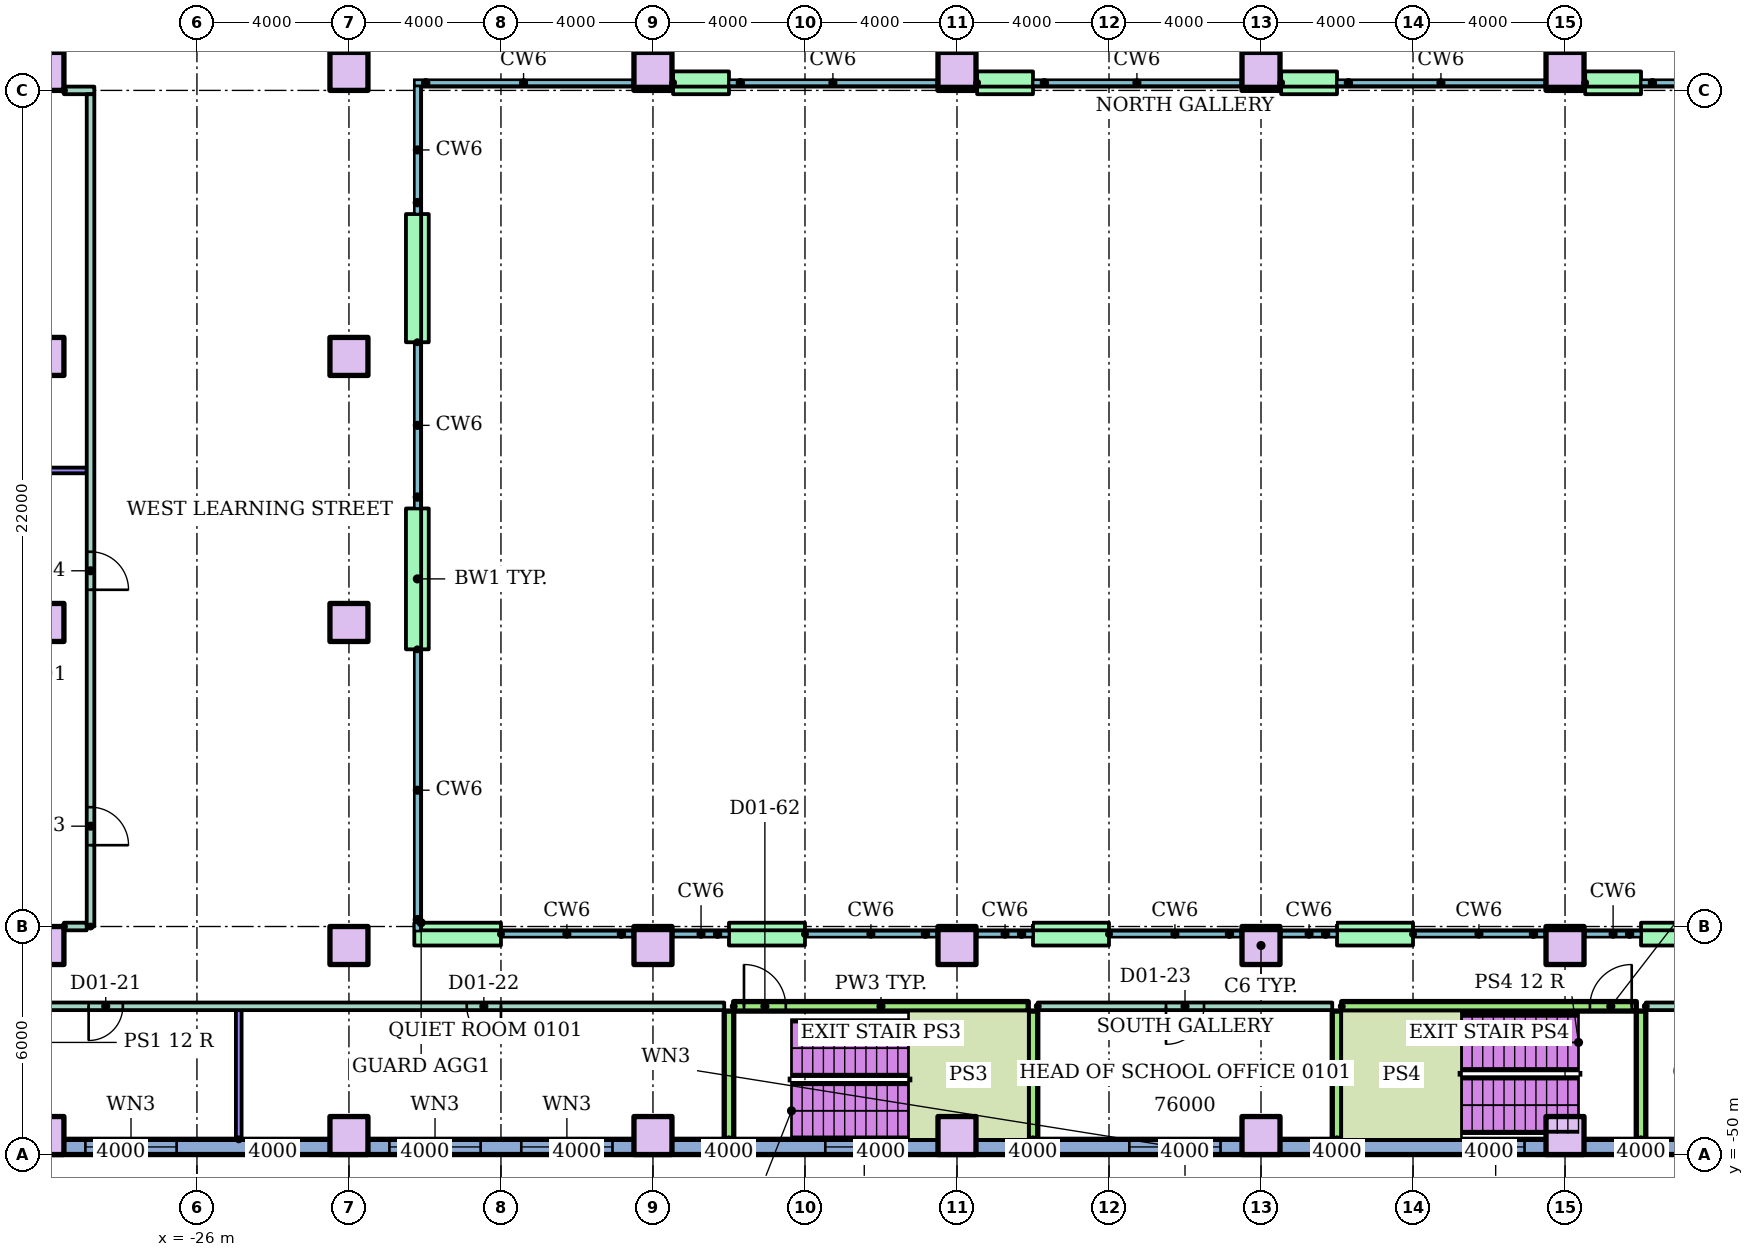
"""IFC4 building model, lengths in metres.
Left out: names, types, materials, properties, quantities, classifications, styles, units other than length and angle.
Written with IfcOpenShell. Run it as: python <this file> out.ifc"""

import sys

from ifc_helpers import new_model, si_unit, direction, frame, frame_2d, origin, origin_2d, place, context, subcontext, project, spatial, rectangle, extrude, element, fill, save


model = new_model("IFC4")
c1 = context("Model", 3, precision=1e-05, world=origin(), true_north=direction((0.0, 1.0)))
c2 = subcontext(c1, "Body", "Model", "MODEL_VIEW")
j1 = project(units=[si_unit("LENGTHUNIT", "METRE"), si_unit("PLANEANGLEUNIT", "RADIAN")], contexts=[c1])
p1 = place(None, origin())
s1 = spatial("IfcSite", under=j1, at=p1, CompositionType="ELEMENT")
p2 = place(p1, origin())
s2 = spatial("IfcBuilding", under=s1, at=p2, CompositionType="ELEMENT")
p3 = place(p2, frame((0.0, 0.0, 6.0)))
s3 = spatial("IfcBuildingStorey", under=s2, at=p3, CompositionType="ELEMENT", Elevation=6.0)
for number, where in (
    (1, (-30.0, -49.5, 0.0)),
    (2, (-22.0, -49.5, 0.0)),
    (3, (-14.0, -49.5, 0.0)),
    (4, (-6.0, -49.5, 0.0)),
    (5, (2.0, -49.5, 0.0)),
    (6, (10.0, -49.5, 0.0)),
    (7, (-30.0, -44.5, 0.0)),
    (8, (-22.0, -44.5, 0.0)),
    (9, (-14.0, -44.5, 0.0)),
    (10, (-6.0, -44.5, 0.0)),
    (11, (2.0, -44.5, 0.0)),
    (12, (10.0, -44.5, 0.0)),
    (13, (-30.0, -36.0, 0.0)),
    (14, (-22.0, -36.0, 0.0)),
    (15, (-30.0, -29.0, 0.0)),
    (16, (-22.0, -29.0, 0.0)),
    (17, (-30.0, -21.5, 0.0)),
    (18, (-22.0, -21.5, 0.0)),
    (19, (-14.0, -21.5, 0.0)),
    (20, (-6.0, -21.5, 0.0)),
    (21, (2.0, -21.5, 0.0)),
    (22, (10.0, -21.5, 0.0)),
):
    element("IfcColumn", number, at=place(p3, frame(where)), inside=s3, PredefinedType="COLUMN", context=c2, shape_type="SweptSolid", body=[
        extrude(rectangle(XDim=1.0, YDim=1.0, at=origin_2d()), origin(), (0.0, 0.0, 1.0), 4.0),
    ])
p4 = place(p3, frame((-39.6, -49.8, 0.0)))
e23 = element("IfcWall", 23, at=p4, inside=s3, PredefinedType="STANDARD", context=c2, shape_type="SweptSolid", body=[
    extrude(rectangle(XDim=79.2, YDim=0.4, at=frame_2d((39.6, 0.0))), origin(), (0.0, 0.0, 1.0), 3.7),
])
p5 = place(p4, frame((10.665, 0.0, 0.9)))
e24 = element("IfcOpeningElement", 24, at=p5, cuts=e23, PredefinedType="OPENING", context=c2, shape_type="SweptSolid", body=[
    extrude(rectangle(XDim=2.4, YDim=2.1, at=frame_2d((1.2, 1.05))), frame((0.0, 0.21, 0.0), z_axis=(0.0, -1.0, 0.0), x_axis=(1.0, 0.0, 0.0)), (0.0, 0.0, 1.0), 0.42),
])
p6 = place(p4, frame((18.665, 0.0, 0.9)))
e25 = element("IfcOpeningElement", 25, at=p6, cuts=e23, PredefinedType="OPENING", context=c2, shape_type="SweptSolid", body=[
    extrude(rectangle(XDim=2.4, YDim=2.1, at=frame_2d((1.2, 1.05))), frame((0.0, 0.21, 0.0), z_axis=(0.0, -1.0, 0.0), x_axis=(1.0, 0.0, 0.0)), (0.0, 0.0, 1.0), 0.42),
])
p7 = place(p4, frame((22.135, 0.0, 0.9)))
e26 = element("IfcOpeningElement", 26, at=p7, cuts=e23, PredefinedType="OPENING", context=c2, shape_type="SweptSolid", body=[
    extrude(rectangle(XDim=2.4, YDim=2.1, at=frame_2d((1.2, 1.05))), frame((0.0, 0.21, 0.0), z_axis=(0.0, -1.0, 0.0), x_axis=(1.0, 0.0, 0.0)), (0.0, 0.0, 1.0), 0.42),
])
p8 = place(p4, frame((30.135, 0.0, 0.9)))
e27 = element("IfcOpeningElement", 27, at=p8, cuts=e23, PredefinedType="OPENING", context=c2, shape_type="SweptSolid", body=[
    extrude(rectangle(XDim=2.05, YDim=2.1, at=frame_2d((1.025, 1.05))), frame((0.0, 0.21, 0.0), z_axis=(0.0, -1.0, 0.0), x_axis=(1.0, 0.0, 0.0)), (0.0, 0.0, 1.0), 0.42),
])
p9 = place(p4, frame((38.135, 0.0, 0.9)))
e28 = element("IfcOpeningElement", 28, at=p9, cuts=e23, PredefinedType="OPENING", context=c2, shape_type="SweptSolid", body=[
    extrude(rectangle(XDim=2.4, YDim=2.1, at=frame_2d((1.2, 1.05))), frame((0.0, 0.21, 0.0), z_axis=(0.0, -1.0, 0.0), x_axis=(1.0, 0.0, 0.0)), (0.0, 0.0, 1.0), 0.42),
])
p10 = place(p4, frame((47.015, 0.0, 0.9)))
e29 = element("IfcOpeningElement", 29, at=p10, cuts=e23, PredefinedType="OPENING", context=c2, shape_type="SweptSolid", body=[
    extrude(rectangle(XDim=1.52, YDim=2.1, at=frame_2d((0.76, 1.05))), frame((0.0, 0.21, 0.0), z_axis=(0.0, -1.0, 0.0), x_axis=(1.0, 0.0, 0.0)), (0.0, 0.0, 1.0), 0.42),
])
p11 = place(p4, frame((54.135, 0.0, 0.9)))
e30 = element("IfcOpeningElement", 30, at=p11, cuts=e23, PredefinedType="OPENING", context=c2, shape_type="SweptSolid", body=[
    extrude(rectangle(XDim=2.4, YDim=2.1, at=frame_2d((1.2, 1.05))), frame((0.0, 0.21, 0.0), z_axis=(0.0, -1.0, 0.0), x_axis=(1.0, 0.0, 0.0)), (0.0, 0.0, 1.0), 0.42),
])
p12 = place(p4, frame((66.665, 0.0, 0.9)))
e31 = element("IfcOpeningElement", 31, at=p12, cuts=e23, PredefinedType="OPENING", context=c2, shape_type="SweptSolid", body=[
    extrude(rectangle(XDim=2.4, YDim=2.1, at=frame_2d((1.2, 1.05))), frame((0.0, 0.21, 0.0), z_axis=(0.0, -1.0, 0.0), x_axis=(1.0, 0.0, 0.0)), (0.0, 0.0, 1.0), 0.42),
])
for number, where, z_axis, x_axis in (
    (32, (14.0, -44.2, 0.0), (0.0, 0.0, 1.0), (-1.0, 0.0, 0.0)),
    (33, (6.0, -44.2, 0.0), (0.0, 0.0, 1.0), (-1.0, 0.0, 0.0)),
    (34, (-2.0, -44.2, 0.0), (0.0, 0.0, 1.0), (-1.0, 0.0, 0.0)),
    (35, (-10.0, -44.2, 0.0), (0.0, 0.0, 1.0), (-1.0, 0.0, 0.0)),
):
    element("IfcWall", number, at=place(p3, frame(where, z_axis=z_axis, x_axis=x_axis)), inside=s3, PredefinedType="STANDARD", context=c2, shape_type="SweptSolid", body=[
        extrude(rectangle(XDim=2.0, YDim=0.6, at=frame_2d((1.0, 0.0))), origin(), (0.0, 0.0, 1.0), 3.7),
    ])
p13 = place(p3, frame((-18.0, -44.2, 0.0), z_axis=(0.0, 0.0, 1.0), x_axis=(-1.0, 0.0, 0.0)))
e36 = element("IfcWall", 36, at=p13, inside=s3, PredefinedType="STANDARD", context=c2, shape_type="SweptSolid", body=[
    extrude(rectangle(XDim=2.28, YDim=0.6, at=frame_2d((1.14, 0.0))), origin(), (0.0, 0.0, 1.0), 3.7),
])
p14 = place(p3, frame((-20.2, -36.707, 0.0), z_axis=(0.0, 0.0, 1.0), x_axis=(0.0, 1.0, 0.0)))
e37 = element("IfcWall", 37, at=p14, inside=s3, PredefinedType="STANDARD", context=c2, shape_type="SweptSolid", body=[
    extrude(rectangle(XDim=3.707, YDim=0.6, at=frame_2d((1.854, 0.0))), origin(), (0.0, 0.0, 1.0), 3.7),
])
p15 = place(p3, frame((-20.2, -28.627, 0.0), z_axis=(0.0, 0.0, 1.0), x_axis=(0.0, 1.0, 0.0)))
e38 = element("IfcWall", 38, at=p15, inside=s3, PredefinedType="STANDARD", context=c2, shape_type="SweptSolid", body=[
    extrude(rectangle(XDim=3.373, YDim=0.6, at=frame_2d((1.687, 0.0))), origin(), (0.0, 0.0, 1.0), 3.7),
])
for number, where in (
    (39, (-13.47, -21.8, 0.0)),
    (40, (-5.47, -21.8, 0.0)),
    (41, (2.53, -21.8, 0.0)),
    (42, (10.53, -21.8, 0.0)),
):
    element("IfcWall", number, at=place(p3, frame(where)), inside=s3, PredefinedType="STANDARD", context=c2, shape_type="SweptSolid", body=[
        extrude(rectangle(XDim=1.47, YDim=0.6, at=frame_2d((0.735, 0.0))), origin(), (0.0, 0.0, 1.0), 3.7),
    ])
p16 = place(p3, frame((-31.775, -46.1, 0.0)))
e43 = element("IfcWall", 43, at=p16, inside=s3, PredefinedType="PARTITIONING", context=c2, shape_type="SweptSolid", body=[
    extrude(rectangle(XDim=19.65, YDim=0.2, at=frame_2d((9.825, 0.0))), origin(), (0.0, 0.0, 1.0), 3.7),
])
p17 = place(p16, frame((2.925, 0.0, 0.0)))
e44 = element("IfcOpeningElement", 44, at=p17, cuts=e43, PredefinedType="OPENING", context=c2, shape_type="SweptSolid", body=[
    extrude(rectangle(XDim=0.9, YDim=2.1, at=frame_2d((0.45, 1.05))), frame((0.0, 0.11, 0.0), z_axis=(0.0, -1.0, 0.0), x_axis=(1.0, 0.0, 0.0)), (0.0, 0.0, 1.0), 0.22),
])
p18 = place(p16, frame((12.875, 0.0, 0.0)))
e45 = element("IfcOpeningElement", 45, at=p18, cuts=e43, PredefinedType="OPENING", context=c2, shape_type="SweptSolid", body=[
    extrude(rectangle(XDim=0.9, YDim=2.1, at=frame_2d((0.45, 1.05))), frame((0.0, 0.11, 0.0), z_axis=(0.0, -1.0, 0.0), x_axis=(1.0, 0.0, 0.0)), (0.0, 0.0, 1.0), 0.22),
])
p19 = place(p3, frame((-3.875, -46.1, 0.0)))
e46 = element("IfcWall", 46, at=p19, inside=s3, PredefinedType="PARTITIONING", context=c2, shape_type="SweptSolid", body=[
    extrude(rectangle(XDim=7.75, YDim=0.2, at=frame_2d((3.875, 0.0))), origin(), (0.0, 0.0, 1.0), 3.7),
])
p20 = place(p19, frame((3.375, 0.0, 0.0)))
e47 = element("IfcOpeningElement", 47, at=p20, cuts=e46, PredefinedType="OPENING", context=c2, shape_type="SweptSolid", body=[
    extrude(rectangle(XDim=1.0, YDim=2.1, at=frame_2d((0.5, 1.05))), frame((0.0, 0.11, 0.0), z_axis=(0.0, -1.0, 0.0), x_axis=(1.0, 0.0, 0.0)), (0.0, 0.0, 1.0), 0.22),
])
p21 = place(p3, frame((12.125, -46.1, 0.0)))
e48 = element("IfcWall", 48, at=p21, inside=s3, PredefinedType="PARTITIONING", context=c2, shape_type="SweptSolid", body=[
    extrude(rectangle(XDim=19.65, YDim=0.2, at=frame_2d((9.825, 0.0))), origin(), (0.0, 0.0, 1.0), 3.7),
])
p22 = place(p21, frame((3.425, 0.0, 0.0)))
e49 = element("IfcOpeningElement", 49, at=p22, cuts=e48, PredefinedType="OPENING", context=c2, shape_type="SweptSolid", body=[
    extrude(rectangle(XDim=0.9, YDim=2.1, at=frame_2d((0.45, 1.05))), frame((0.0, 0.11, 0.0), z_axis=(0.0, -1.0, 0.0), x_axis=(1.0, 0.0, 0.0)), (0.0, 0.0, 1.0), 0.22),
])
p23 = place(p21, frame((12.225, 0.0, 0.0)))
e50 = element("IfcOpeningElement", 50, at=p23, cuts=e48, PredefinedType="OPENING", context=c2, shape_type="SweptSolid", body=[
    extrude(rectangle(XDim=1.0, YDim=2.1, at=frame_2d((0.5, 1.05))), frame((0.0, 0.11, 0.0), z_axis=(0.0, -1.0, 0.0), x_axis=(1.0, 0.0, 0.0)), (0.0, 0.0, 1.0), 0.22),
])
p24 = place(p3, frame((-11.875, -46.1, 0.0)))
e51 = element("IfcWall", 51, at=p24, inside=s3, PredefinedType="SOLIDWALL", context=c2, shape_type="SweptSolid", body=[
    extrude(rectangle(XDim=7.75, YDim=0.25, at=frame_2d((3.875, 0.0))), origin(), (0.0, 0.0, 1.0), 3.7),
])
p25 = place(p24, frame((0.27, 0.0, 0.0)))
e52 = element("IfcOpeningElement", 52, at=p25, cuts=e51, PredefinedType="OPENING", context=c2, shape_type="SweptSolid", body=[
    extrude(rectangle(XDim=1.1, YDim=2.1, at=frame_2d((0.55, 1.05))), frame((0.0, 0.135, 0.0), z_axis=(0.0, -1.0, 0.0), x_axis=(1.0, 0.0, 0.0)), (0.0, 0.0, 1.0), 0.27),
])
p26 = place(p3, frame((4.125, -46.1, 0.0)))
e53 = element("IfcWall", 53, at=p26, inside=s3, PredefinedType="SOLIDWALL", context=c2, shape_type="SweptSolid", body=[
    extrude(rectangle(XDim=7.75, YDim=0.25, at=frame_2d((3.875, 0.0))), origin(), (0.0, 0.0, 1.0), 3.7),
])
p27 = place(p26, frame((6.53, 0.0, 0.0)))
e54 = element("IfcOpeningElement", 54, at=p27, cuts=e53, PredefinedType="OPENING", context=c2, shape_type="SweptSolid", body=[
    extrude(rectangle(XDim=1.1, YDim=2.1, at=frame_2d((0.55, 1.05))), frame((0.0, 0.135, 0.0), z_axis=(0.0, -1.0, 0.0), x_axis=(1.0, 0.0, 0.0)), (0.0, 0.0, 1.0), 0.27),
])
p28 = place(p3, frame((-29.5, -44.0, 0.0)))
e55 = element("IfcWall", 55, at=p28, inside=s3, PredefinedType="PARTITIONING", context=c2, shape_type="SweptSolid", body=[
    extrude(rectangle(XDim=0.6, YDim=0.2, at=frame_2d((0.3, 0.0))), origin(), (0.0, 0.0, 1.0), 3.7),
])
p29 = place(p3, frame((-39.6, -32.0, 0.0)))
e56 = element("IfcWall", 56, at=p29, inside=s3, PredefinedType="PARTITIONING", context=c2, shape_type="SweptSolid", body=[
    extrude(rectangle(XDim=10.7, YDim=0.15, at=frame_2d((5.35, 0.0))), origin(), (0.0, 0.0, 1.0), 3.7),
])
p30 = place(p3, frame((-29.5, -22.0, 0.0)))
e57 = element("IfcWall", 57, at=p30, inside=s3, PredefinedType="PARTITIONING", context=c2, shape_type="SweptSolid", body=[
    extrude(rectangle(XDim=0.8, YDim=0.2, at=frame_2d((0.4, 0.0))), origin(), (0.0, 0.0, 1.0), 3.7),
])
p31 = place(p3, frame((-28.8, -44.0, 0.0), z_axis=(0.0, 0.0, 1.0), x_axis=(0.0, 1.0, 0.0)))
e58 = element("IfcWall", 58, at=p31, inside=s3, PredefinedType="PARTITIONING", context=c2, shape_type="SweptSolid", body=[
    extrude(rectangle(XDim=21.9, YDim=0.2, at=frame_2d((10.95, 0.0))), origin(), (0.0, 0.0, 1.0), 3.7),
])
p32 = place(p31, frame((2.14, 0.0, 0.0)))
e59 = element("IfcOpeningElement", 59, at=p32, cuts=e58, PredefinedType="OPENING", context=c2, shape_type="SweptSolid", body=[
    extrude(rectangle(XDim=1.0, YDim=2.1, at=frame_2d((0.5, 1.05))), frame((0.0, 0.11, 0.0), z_axis=(0.0, -1.0, 0.0), x_axis=(1.0, 0.0, 0.0)), (0.0, 0.0, 1.0), 0.22),
])
p33 = place(p31, frame((8.86, 0.0, 0.0)))
e60 = element("IfcOpeningElement", 60, at=p33, cuts=e58, PredefinedType="OPENING", context=c2, shape_type="SweptSolid", body=[
    extrude(rectangle(XDim=1.0, YDim=2.1, at=frame_2d((0.5, 1.05))), frame((0.0, 0.11, 0.0), z_axis=(0.0, -1.0, 0.0), x_axis=(1.0, 0.0, 0.0)), (0.0, 0.0, 1.0), 0.22),
])
p34 = place(p3, frame((-24.9, -49.6, 0.0), z_axis=(0.0, 0.0, 1.0), x_axis=(0.0, 1.0, 0.0)))
e61 = element("IfcWall", 61, at=p34, inside=s3, PredefinedType="PARTITIONING", context=c2, shape_type="SweptSolid", body=[
    extrude(rectangle(XDim=3.4, YDim=0.15, at=frame_2d((1.7, 0.0))), origin(), (0.0, 0.0, 1.0), 3.7),
])
for number, where, z_axis, x_axis in (
    (62, (-12.0, -49.6, 0.0), (0.0, 0.0, 1.0), (0.0, 1.0, 0.0)),
    (63, (-4.0, -49.6, 0.0), (0.0, 0.0, 1.0), (0.0, 1.0, 0.0)),
    (64, (4.0, -49.6, 0.0), (0.0, 0.0, 1.0), (0.0, 1.0, 0.0)),
    (65, (12.0, -49.6, 0.0), (0.0, 0.0, 1.0), (0.0, 1.0, 0.0)),
):
    element("IfcWall", number, at=place(p3, frame(where, z_axis=z_axis, x_axis=x_axis)), inside=s3, PredefinedType="SOLIDWALL", context=c2, shape_type="SweptSolid", body=[
        extrude(rectangle(XDim=3.375, YDim=0.25, at=frame_2d((1.688, 0.0))), origin(), (0.0, 0.0, 1.0), 3.7),
    ])
p35 = place(p5, origin())
e66 = element("IfcWindow", 66, at=p35, inside=s3, PartitioningType="SINGLE_PANEL", PredefinedType="WINDOW", context=c2, shape_type="SweptSolid", body=[
    extrude(rectangle(XDim=2.4, YDim=2.1, at=frame_2d((1.2, 1.05))), frame((0.0, 0.03, 0.0), z_axis=(0.0, -1.0, 0.0), x_axis=(1.0, 0.0, 0.0)), (0.0, 0.0, 1.0), 0.06),
])
fill(e24, e66)
p36 = place(p6, origin())
e67 = element("IfcWindow", 67, at=p36, inside=s3, PartitioningType="SINGLE_PANEL", PredefinedType="WINDOW", context=c2, shape_type="SweptSolid", body=[
    extrude(rectangle(XDim=2.4, YDim=2.1, at=frame_2d((1.2, 1.05))), frame((0.0, 0.03, 0.0), z_axis=(0.0, -1.0, 0.0), x_axis=(1.0, 0.0, 0.0)), (0.0, 0.0, 1.0), 0.06),
])
fill(e25, e67)
p37 = place(p7, origin())
e68 = element("IfcWindow", 68, at=p37, inside=s3, PartitioningType="SINGLE_PANEL", PredefinedType="WINDOW", context=c2, shape_type="SweptSolid", body=[
    extrude(rectangle(XDim=2.4, YDim=2.1, at=frame_2d((1.2, 1.05))), frame((0.0, 0.03, 0.0), z_axis=(0.0, -1.0, 0.0), x_axis=(1.0, 0.0, 0.0)), (0.0, 0.0, 1.0), 0.06),
])
fill(e26, e68)
p38 = place(p8, origin())
e69 = element("IfcWindow", 69, at=p38, inside=s3, PartitioningType="SINGLE_PANEL", PredefinedType="WINDOW", context=c2, shape_type="SweptSolid", body=[
    extrude(rectangle(XDim=2.05, YDim=2.1, at=frame_2d((1.025, 1.05))), frame((0.0, 0.03, 0.0), z_axis=(0.0, -1.0, 0.0), x_axis=(1.0, 0.0, 0.0)), (0.0, 0.0, 1.0), 0.06),
])
fill(e27, e69)
p39 = place(p9, origin())
e70 = element("IfcWindow", 70, at=p39, inside=s3, PartitioningType="SINGLE_PANEL", PredefinedType="WINDOW", context=c2, shape_type="SweptSolid", body=[
    extrude(rectangle(XDim=2.4, YDim=2.1, at=frame_2d((1.2, 1.05))), frame((0.0, 0.03, 0.0), z_axis=(0.0, -1.0, 0.0), x_axis=(1.0, 0.0, 0.0)), (0.0, 0.0, 1.0), 0.06),
])
fill(e28, e70)
p40 = place(p10, origin())
e71 = element("IfcWindow", 71, at=p40, inside=s3, PartitioningType="SINGLE_PANEL", PredefinedType="WINDOW", context=c2, shape_type="SweptSolid", body=[
    extrude(rectangle(XDim=1.52, YDim=2.1, at=frame_2d((0.76, 1.05))), frame((0.0, 0.03, 0.0), z_axis=(0.0, -1.0, 0.0), x_axis=(1.0, 0.0, 0.0)), (0.0, 0.0, 1.0), 0.06),
])
fill(e29, e71)
p41 = place(p32, frame((1.0, 0.0, 0.0), z_axis=(0.0, 0.0, 1.0), x_axis=(-1.0, 0.0, 0.0)))
e72 = element("IfcDoor", 72, at=p41, inside=s3, OperationType="SINGLE_SWING_LEFT", PredefinedType="DOOR", context=c2, shape_type="SweptSolid", body=[
    extrude(rectangle(XDim=1.0, YDim=2.1, at=frame_2d((0.5, 1.05))), frame((0.0, 0.025, 0.0), z_axis=(0.0, -1.0, 0.0), x_axis=(1.0, 0.0, 0.0)), (0.0, 0.0, 1.0), 0.05),
])
fill(e59, e72)
p42 = place(p33, frame((1.0, 0.0, 0.0), z_axis=(0.0, 0.0, 1.0), x_axis=(-1.0, 0.0, 0.0)))
e73 = element("IfcDoor", 73, at=p42, inside=s3, OperationType="SINGLE_SWING_LEFT", PredefinedType="DOOR", context=c2, shape_type="SweptSolid", body=[
    extrude(rectangle(XDim=1.0, YDim=2.1, at=frame_2d((0.5, 1.05))), frame((0.0, 0.025, 0.0), z_axis=(0.0, -1.0, 0.0), x_axis=(1.0, 0.0, 0.0)), (0.0, 0.0, 1.0), 0.05),
])
fill(e60, e73)
p43 = place(p17, frame((0.9, 0.0, 0.0), z_axis=(0.0, 0.0, 1.0), x_axis=(-1.0, 0.0, 0.0)))
e74 = element("IfcDoor", 74, at=p43, inside=s3, OperationType="SINGLE_SWING_LEFT", PredefinedType="DOOR", context=c2, shape_type="SweptSolid", body=[
    extrude(rectangle(XDim=0.9, YDim=2.1, at=frame_2d((0.45, 1.05))), frame((0.0, 0.025, 0.0), z_axis=(0.0, -1.0, 0.0), x_axis=(1.0, 0.0, 0.0)), (0.0, 0.0, 1.0), 0.05),
])
fill(e44, e74)
p44 = place(p18, frame((0.9, 0.0, 0.0), z_axis=(0.0, 0.0, 1.0), x_axis=(-1.0, 0.0, 0.0)))
e75 = element("IfcDoor", 75, at=p44, inside=s3, OperationType="SINGLE_SWING_RIGHT", PredefinedType="DOOR", context=c2, shape_type="SweptSolid", body=[
    extrude(rectangle(XDim=0.9, YDim=2.1, at=frame_2d((0.45, 1.05))), frame((0.0, 0.025, 0.0), z_axis=(0.0, -1.0, 0.0), x_axis=(1.0, 0.0, 0.0)), (0.0, 0.0, 1.0), 0.05),
])
fill(e45, e75)
p45 = place(p20, frame((1.0, 0.0, 0.0), z_axis=(0.0, 0.0, 1.0), x_axis=(-1.0, 0.0, 0.0)))
e76 = element("IfcDoor", 76, at=p45, inside=s3, OperationType="SINGLE_SWING_LEFT", PredefinedType="DOOR", context=c2, shape_type="SweptSolid", body=[
    extrude(rectangle(XDim=1.0, YDim=2.1, at=frame_2d((0.5, 1.05))), frame((0.0, 0.025, 0.0), z_axis=(0.0, -1.0, 0.0), x_axis=(1.0, 0.0, 0.0)), (0.0, 0.0, 1.0), 0.05),
])
fill(e47, e76)
p46 = place(p25, origin())
e77 = element("IfcDoor", 77, at=p46, inside=s3, OperationType="SINGLE_SWING_LEFT", PredefinedType="DOOR", context=c2, shape_type="SweptSolid", body=[
    extrude(rectangle(XDim=1.1, YDim=2.1, at=frame_2d((0.55, 1.05))), frame((0.0, 0.025, 0.0), z_axis=(0.0, -1.0, 0.0), x_axis=(1.0, 0.0, 0.0)), (0.0, 0.0, 1.0), 0.05),
])
fill(e52, e77)
p47 = place(p27, origin())
e78 = element("IfcDoor", 78, at=p47, inside=s3, OperationType="SINGLE_SWING_RIGHT", PredefinedType="DOOR", context=c2, shape_type="SweptSolid", body=[
    extrude(rectangle(XDim=1.1, YDim=2.1, at=frame_2d((0.55, 1.05))), frame((0.0, 0.025, 0.0), z_axis=(0.0, -1.0, 0.0), x_axis=(1.0, 0.0, 0.0)), (0.0, 0.0, 1.0), 0.05),
])
fill(e54, e78)
save(model, sys.argv[1])
